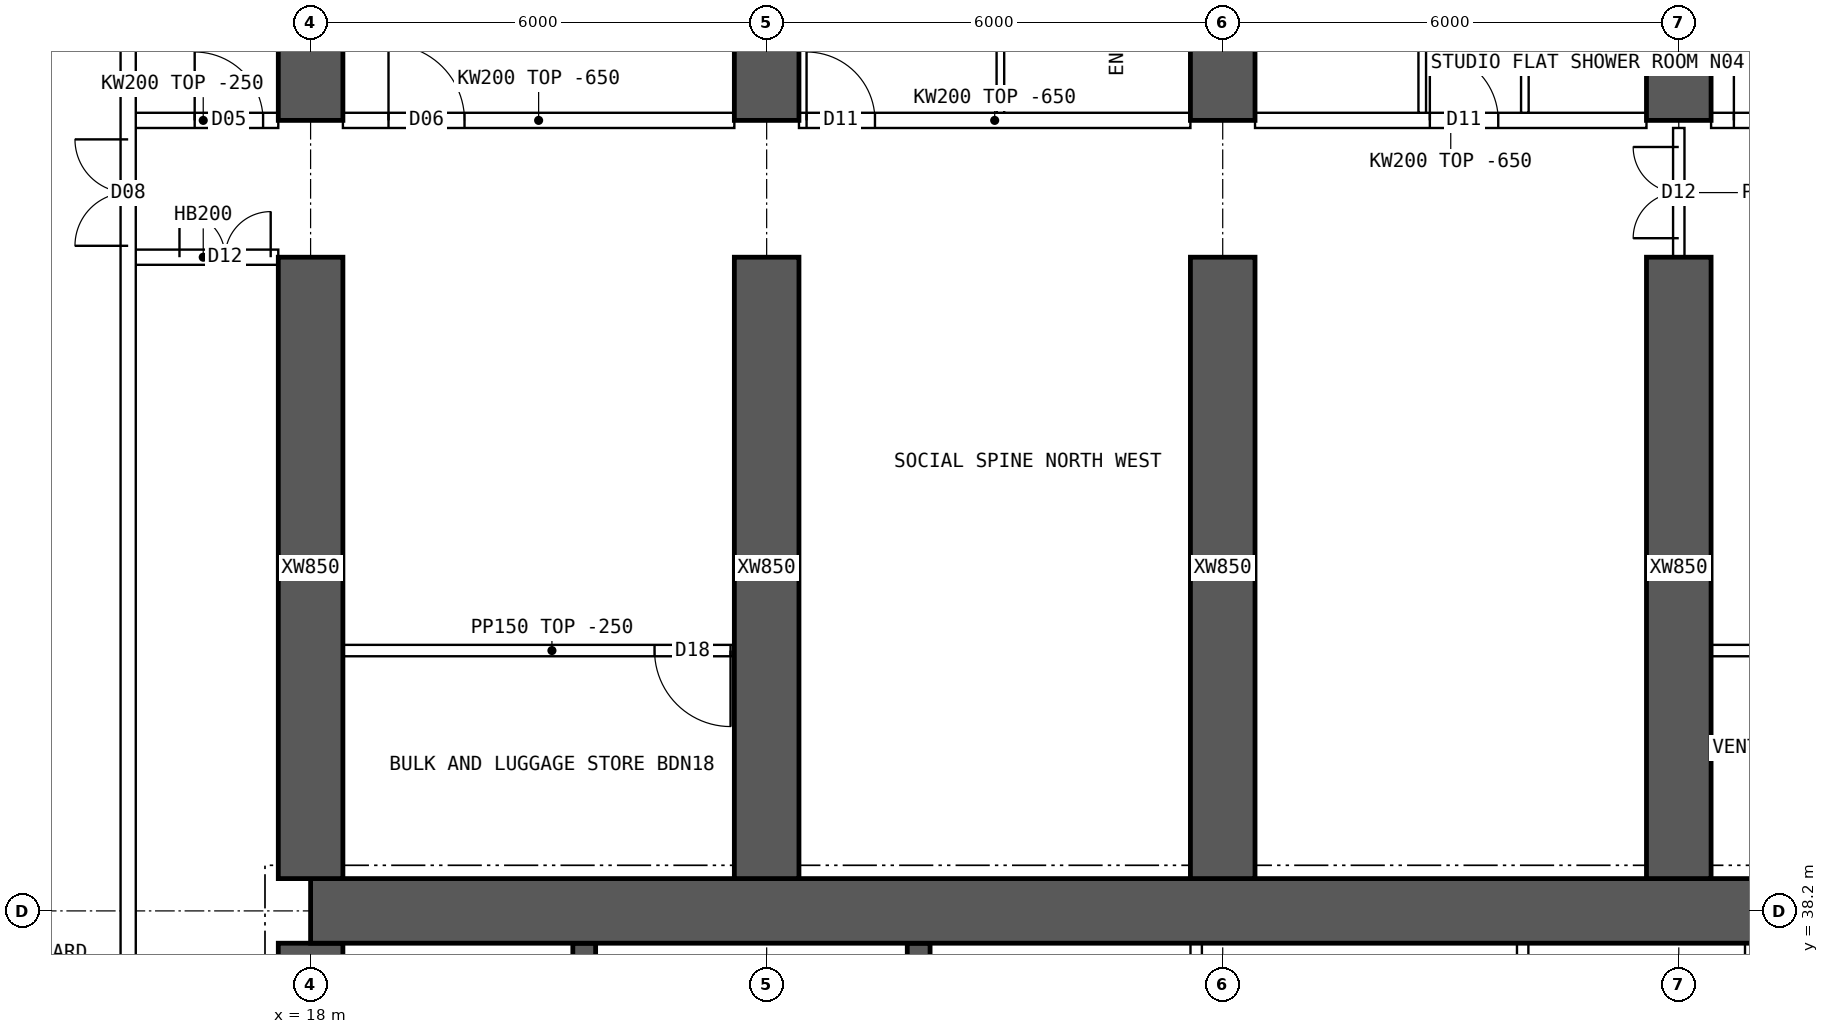
"""IFC4 building model, lengths in metres.
Left out: names, types, materials, properties, quantities, classifications, styles, units other than length and angle.
Written with IfcOpenShell. Run it as: python <this file> out.ifc"""

import sys

from ifc_helpers import new_model, si_unit, direction, frame, frame_2d, origin, place, context, subcontext, project, spatial, polyline, rectangle, outline, extrude, element, fill, save


model = new_model("IFC4")
c1 = context("Model", 3, precision=1e-05, world=origin(), true_north=direction((0.0, 1.0)))
c2 = subcontext(c1, "Body", "Model", "MODEL_VIEW")
j1 = project(units=[si_unit("LENGTHUNIT", "METRE"), si_unit("PLANEANGLEUNIT", "RADIAN")], contexts=[c1])
p1 = place(None, origin())
s1 = spatial("IfcSite", under=j1, at=p1, CompositionType="ELEMENT")
p2 = place(p1, origin())
s2 = spatial("IfcBuilding", under=s1, at=p2, CompositionType="ELEMENT")
p3 = place(p2, frame((0.0, 0.0, 167.35)))
s3 = spatial("IfcBuildingStorey", under=s2, at=p3, CompositionType="ELEMENT", Elevation=167.35)
p4 = place(p3, frame((18.0, 38.2, 0.0), z_axis=(0.0, 0.0, 1.0), x_axis=(1.0, 0.0, 0.0)))
e1 = element("IfcWall", 1, at=p4, inside=s3, PredefinedType="SHEAR", context=c2, shape_type="SweptSolid", body=[
    extrude(rectangle(XDim=48.0, YDim=0.85, at=frame_2d((24.0, 0.0))), origin(), (0.0, 0.0, 1.0), 3.75),
])
p5 = place(p3, frame((18.0, 26.225, 0.0), z_axis=(0.0, 0.0, 1.0), x_axis=(0.0, 1.0, 0.0)))
e2 = element("IfcWall", 2, at=p5, inside=s3, PredefinedType="SHEAR", context=c2, shape_type="SweptSolid", body=[
    extrude(rectangle(XDim=11.55, YDim=0.85, at=frame_2d((5.775, 0.0))), origin(), (0.0, 0.0, 1.0), 3.75),
])
p6 = place(p5, frame((5.075, 0.0, 0.0)))
e3 = element("IfcOpeningElement", 3, at=p6, cuts=e2, PredefinedType="OPENING", context=c2, shape_type="SweptSolid", body=[
    extrude(rectangle(XDim=1.2, YDim=2.1, at=frame_2d((0.6, 1.05))), frame((0.0, 0.435, 0.0), z_axis=(0.0, -1.0, 0.0), x_axis=(1.0, 0.0, 0.0)), (0.0, 0.0, 1.0), 0.87),
])
for number, where, z_axis, x_axis in (
    (4, (21.6, 34.75, 0.0), (0.0, 0.0, 1.0), (0.0, 1.0, 0.0)),
    (5, (26.0, 34.75, 0.0), (0.0, 0.0, 1.0), (0.0, 1.0, 0.0)),
):
    element("IfcWall", number, at=place(p3, frame(where, z_axis=z_axis, x_axis=x_axis)), inside=s3, PredefinedType="SHEAR", context=c2, shape_type="SweptSolid", body=[
        extrude(rectangle(XDim=3.025, YDim=0.3, at=frame_2d((1.512, 0.0))), origin(), (0.0, 0.0, 1.0), 3.75),
    ])
p7 = place(p3, frame((18.0, 48.6, 0.0), z_axis=(0.0, 0.0, 1.0), x_axis=(0.0, 1.0, 0.0)))
e6 = element("IfcWall", 6, at=p7, inside=s3, PredefinedType="SHEAR", context=c2, shape_type="SweptSolid", body=[
    extrude(rectangle(XDim=5.4, YDim=0.85, at=frame_2d((2.7, 0.0))), origin(), (0.0, 0.0, 1.0), 3.75),
])
p8 = place(p3, frame((18.0, 38.625, 0.0), z_axis=(0.0, 0.0, 1.0), x_axis=(0.0, 1.0, 0.0)))
e7 = element("IfcWall", 7, at=p8, inside=s3, PredefinedType="SHEAR", context=c2, shape_type="SweptSolid", body=[
    extrude(rectangle(XDim=8.175, YDim=0.85, at=frame_2d((4.087, 0.0))), origin(), (0.0, 0.0, 1.0), 3.75),
])
p9 = place(p3, frame((24.0, 48.6, 0.0), z_axis=(0.0, 0.0, 1.0), x_axis=(0.0, 1.0, 0.0)))
e8 = element("IfcWall", 8, at=p9, inside=s3, PredefinedType="SHEAR", context=c2, shape_type="SweptSolid", body=[
    extrude(rectangle(XDim=5.4, YDim=0.85, at=frame_2d((2.7, 0.0))), origin(), (0.0, 0.0, 1.0), 3.75),
])
p10 = place(p3, frame((24.0, 38.625, 0.0), z_axis=(0.0, 0.0, 1.0), x_axis=(0.0, 1.0, 0.0)))
e9 = element("IfcWall", 9, at=p10, inside=s3, PredefinedType="SHEAR", context=c2, shape_type="SweptSolid", body=[
    extrude(rectangle(XDim=8.175, YDim=0.85, at=frame_2d((4.087, 0.0))), origin(), (0.0, 0.0, 1.0), 3.75),
])
p11 = place(p3, frame((30.0, 48.6, 0.0), z_axis=(0.0, 0.0, 1.0), x_axis=(0.0, 1.0, 0.0)))
e10 = element("IfcWall", 10, at=p11, inside=s3, PredefinedType="SHEAR", context=c2, shape_type="SweptSolid", body=[
    extrude(rectangle(XDim=5.4, YDim=0.85, at=frame_2d((2.7, 0.0))), origin(), (0.0, 0.0, 1.0), 3.75),
])
p12 = place(p3, frame((30.0, 38.625, 0.0), z_axis=(0.0, 0.0, 1.0), x_axis=(0.0, 1.0, 0.0)))
e11 = element("IfcWall", 11, at=p12, inside=s3, PredefinedType="SHEAR", context=c2, shape_type="SweptSolid", body=[
    extrude(rectangle(XDim=8.175, YDim=0.85, at=frame_2d((4.087, 0.0))), origin(), (0.0, 0.0, 1.0), 3.75),
])
p13 = place(p3, frame((36.0, 48.6, 0.0), z_axis=(0.0, 0.0, 1.0), x_axis=(0.0, 1.0, 0.0)))
e12 = element("IfcWall", 12, at=p13, inside=s3, PredefinedType="SHEAR", context=c2, shape_type="SweptSolid", body=[
    extrude(rectangle(XDim=5.4, YDim=0.85, at=frame_2d((2.7, 0.0))), origin(), (0.0, 0.0, 1.0), 3.75),
])
p14 = place(p3, frame((36.0, 38.625, 0.0), z_axis=(0.0, 0.0, 1.0), x_axis=(0.0, 1.0, 0.0)))
e13 = element("IfcWall", 13, at=p14, inside=s3, PredefinedType="SHEAR", context=c2, shape_type="SweptSolid", body=[
    extrude(rectangle(XDim=8.175, YDim=0.85, at=frame_2d((4.087, 0.0))), origin(), (0.0, 0.0, 1.0), 3.75),
])
for number, where, z_axis, x_axis in (
    (14, (29.651, 34.75, 0.0), (0.0, 0.0, 1.0), (0.0, 1.0, 0.0)),
    (15, (33.946, 34.75, 0.0), (0.0, 0.0, 1.0), (0.0, 1.0, 0.0)),
    (16, (36.946, 34.75, 0.0), (0.0, 0.0, 1.0), (0.0, 1.0, 0.0)),
):
    element("IfcWall", number, at=place(p3, frame(where, z_axis=z_axis, x_axis=x_axis)), inside=s3, PredefinedType="SOLIDWALL", context=c2, shape_type="SweptSolid", body=[
        extrude(rectangle(XDim=3.025, YDim=0.15, at=frame_2d((1.512, 0.0))), origin(), (0.0, 0.0, 1.0), 3.5),
    ])
p15 = place(p3, frame((15.6, 48.6, 0.0), z_axis=(0.0, 0.0, 1.0), x_axis=(1.0, 0.0, 0.0)))
e17 = element("IfcWall", 17, at=p15, inside=s3, PredefinedType="SOLIDWALL", context=c2, shape_type="SweptSolid", body=[
    extrude(rectangle(XDim=1.975, YDim=0.2, at=frame_2d((0.987, 0.0))), origin(), (0.0, 0.0, 1.0), 3.5),
])
p16 = place(p15, frame((0.875, 0.0, 0.0)))
e18 = element("IfcOpeningElement", 18, at=p16, cuts=e17, PredefinedType="OPENING", context=c2, shape_type="SweptSolid", body=[
    extrude(rectangle(XDim=0.9, YDim=2.1, at=frame_2d((0.45, 1.05))), frame((0.0, 0.11, 0.0), z_axis=(0.0, -1.0, 0.0), x_axis=(1.0, 0.0, 0.0)), (0.0, 0.0, 1.0), 0.22),
])
p17 = place(p3, frame((15.6, 46.8, 0.0), z_axis=(0.0, 0.0, 1.0), x_axis=(1.0, 0.0, 0.0)))
e19 = element("IfcWall", 19, at=p17, inside=s3, PredefinedType="SOLIDWALL", context=c2, shape_type="SweptSolid", body=[
    extrude(rectangle(XDim=1.975, YDim=0.2, at=frame_2d((0.987, 0.0))), origin(), (0.0, 0.0, 1.0), 3.5),
])
p18 = place(p17, frame((0.675, 0.0, 0.0)))
e20 = element("IfcOpeningElement", 20, at=p18, cuts=e19, PredefinedType="OPENING", context=c2, shape_type="SweptSolid", body=[
    extrude(rectangle(XDim=1.2, YDim=2.1, at=frame_2d((0.6, 1.05))), frame((0.0, 0.11, 0.0), z_axis=(0.0, -1.0, 0.0), x_axis=(1.0, 0.0, 0.0)), (0.0, 0.0, 1.0), 0.22),
])
p19 = place(p3, frame((18.425, 48.6, 0.0), z_axis=(0.0, 0.0, 1.0), x_axis=(1.0, 0.0, 0.0)))
e21 = element("IfcWall", 21, at=p19, inside=s3, PredefinedType="SOLIDWALL", context=c2, shape_type="SweptSolid", body=[
    extrude(outline(polyline([(0.0, 0.0), (5.15, 0.0), (5.15, 3.1), (0.0, 3.1), (0.0, 0.0)])), frame((0.0, 0.1, 0.0), z_axis=(0.0, -1.0, 0.0), x_axis=(1.0, 0.0, 0.0)), (0.0, 0.0, 1.0), 0.2),
])
p20 = place(p19, frame((0.6, 0.0, 0.0)))
e22 = element("IfcOpeningElement", 22, at=p20, cuts=e21, PredefinedType="OPENING", context=c2, shape_type="SweptSolid", body=[
    extrude(rectangle(XDim=1.0, YDim=2.1, at=frame_2d((0.5, 1.05))), frame((0.0, 0.11, 0.0), z_axis=(0.0, -1.0, 0.0), x_axis=(1.0, 0.0, 0.0)), (0.0, 0.0, 1.0), 0.22),
])
p21 = place(p3, frame((24.425, 48.6, 0.0), z_axis=(0.0, 0.0, 1.0), x_axis=(1.0, 0.0, 0.0)))
e23 = element("IfcWall", 23, at=p21, inside=s3, PredefinedType="SOLIDWALL", context=c2, shape_type="SweptSolid", body=[
    extrude(outline(polyline([(0.0, 0.0), (5.15, 0.0), (5.15, 3.1), (0.0, 3.1), (0.0, 0.0)])), frame((0.0, 0.1, 0.0), z_axis=(0.0, -1.0, 0.0), x_axis=(1.0, 0.0, 0.0)), (0.0, 0.0, 1.0), 0.2),
])
p22 = place(p21, frame((0.1, 0.0, 0.0)))
e24 = element("IfcOpeningElement", 24, at=p22, cuts=e23, PredefinedType="OPENING", context=c2, shape_type="SweptSolid", body=[
    extrude(rectangle(XDim=0.9, YDim=2.1, at=frame_2d((0.45, 1.05))), frame((0.0, 0.11, 0.0), z_axis=(0.0, -1.0, 0.0), x_axis=(1.0, 0.0, 0.0)), (0.0, 0.0, 1.0), 0.22),
])
p23 = place(p3, frame((30.425, 48.6, 0.0), z_axis=(0.0, 0.0, 1.0), x_axis=(1.0, 0.0, 0.0)))
e25 = element("IfcWall", 25, at=p23, inside=s3, PredefinedType="SOLIDWALL", context=c2, shape_type="SweptSolid", body=[
    extrude(outline(polyline([(0.0, 0.0), (5.15, 0.0), (5.15, 3.1), (0.0, 3.1), (0.0, 0.0)])), frame((0.0, 0.1, 0.0), z_axis=(0.0, -1.0, 0.0), x_axis=(1.0, 0.0, 0.0)), (0.0, 0.0, 1.0), 0.2),
])
p24 = place(p23, frame((2.3, 0.0, 0.0)))
e26 = element("IfcOpeningElement", 26, at=p24, cuts=e25, PredefinedType="OPENING", context=c2, shape_type="SweptSolid", body=[
    extrude(rectangle(XDim=0.9, YDim=2.1, at=frame_2d((0.45, 1.05))), frame((0.0, 0.11, 0.0), z_axis=(0.0, -1.0, 0.0), x_axis=(1.0, 0.0, 0.0)), (0.0, 0.0, 1.0), 0.22),
])
p25 = place(p3, frame((36.425, 48.6, 0.0), z_axis=(0.0, 0.0, 1.0), x_axis=(1.0, 0.0, 0.0)))
e27 = element("IfcWall", 27, at=p25, inside=s3, PredefinedType="SOLIDWALL", context=c2, shape_type="SweptSolid", body=[
    extrude(outline(polyline([(0.0, 0.0), (5.15, 0.0), (5.15, 3.1), (0.0, 3.1), (0.0, 0.0)])), frame((0.0, 0.1, 0.0), z_axis=(0.0, -1.0, 0.0), x_axis=(1.0, 0.0, 0.0)), (0.0, 0.0, 1.0), 0.2),
])
p26 = place(p25, frame((0.3, 0.0, 0.0)))
e28 = element("IfcOpeningElement", 28, at=p26, cuts=e27, PredefinedType="OPENING", context=c2, shape_type="SweptSolid", body=[
    extrude(rectangle(XDim=1.0, YDim=2.1, at=frame_2d((0.5, 1.05))), frame((0.0, 0.11, 0.0), z_axis=(0.0, -1.0, 0.0), x_axis=(1.0, 0.0, 0.0)), (0.0, 0.0, 1.0), 0.22),
])
p27 = place(p3, frame((27.075, 51.45, 0.0), z_axis=(0.0, 0.0, 1.0), x_axis=(0.0, -1.0, 0.0)))
e29 = element("IfcWall", 29, at=p27, inside=s3, PredefinedType="PARTITIONING", context=c2, shape_type="SweptSolid", body=[
    extrude(outline(polyline([(0.0, 0.0), (2.75, 0.0), (2.75, 3.1), (2.702, 3.1), (2.7, 3.5), (0.0, 3.5), (0.0, 0.0)])), frame((0.0, 0.05, 0.0), z_axis=(0.0, -1.0, 0.0), x_axis=(1.0, 0.0, 0.0)), (0.0, 0.0, 1.0), 0.1),
])
p28 = place(p3, frame((32.625, 51.05, 0.0), z_axis=(0.0, 0.0, 1.0), x_axis=(0.0, -1.0, 0.0)))
e30 = element("IfcWall", 30, at=p28, inside=s3, PredefinedType="PARTITIONING", context=c2, shape_type="SweptSolid", body=[
    extrude(outline(polyline([(0.0, 0.0), (2.35, 0.0), (2.35, 3.1), (2.302, 3.1), (2.3, 3.5), (0.0, 3.5), (0.0, 0.0)])), frame((0.0, 0.05, 0.0), z_axis=(0.0, -1.0, 0.0), x_axis=(1.0, 0.0, 0.0)), (0.0, 0.0, 1.0), 0.1),
])
p29 = place(p3, frame((33.975, 51.05, 0.0), z_axis=(0.0, 0.0, 1.0), x_axis=(0.0, -1.0, 0.0)))
e31 = element("IfcWall", 31, at=p29, inside=s3, PredefinedType="PARTITIONING", context=c2, shape_type="SweptSolid", body=[
    extrude(outline(polyline([(0.0, 0.0), (2.35, 0.0), (2.35, 3.1), (2.302, 3.1), (2.3, 3.5), (0.0, 3.5), (0.0, 0.0)])), frame((0.0, 0.05, 0.0), z_axis=(0.0, -1.0, 0.0), x_axis=(1.0, 0.0, 0.0)), (0.0, 0.0, 1.0), 0.1),
])
p30 = place(p29, frame((0.8, 0.0, 0.0)))
e32 = element("IfcOpeningElement", 32, at=p30, cuts=e31, PredefinedType="OPENING", context=c2, shape_type="SweptSolid", body=[
    extrude(rectangle(XDim=0.8, YDim=2.1, at=frame_2d((0.4, 1.05))), frame((0.0, 0.06, 0.0), z_axis=(0.0, -1.0, 0.0), x_axis=(1.0, 0.0, 0.0)), (0.0, 0.0, 1.0), 0.12),
])
p31 = place(p3, frame((23.925, 41.625, 0.0), z_axis=(0.0, 0.0, 1.0), x_axis=(-1.0, 0.0, 0.0)))
e33 = element("IfcWall", 33, at=p31, inside=s3, PredefinedType="PARTITIONING", context=c2, shape_type="SweptSolid", body=[
    extrude(rectangle(XDim=5.5, YDim=0.15, at=frame_2d((2.75, 0.0))), origin(), (0.0, 0.0, 1.0), 3.5),
])
p32 = place(p31, frame((0.4, 0.0, 0.0)))
e34 = element("IfcOpeningElement", 34, at=p32, cuts=e33, PredefinedType="OPENING", context=c2, shape_type="SweptSolid", body=[
    extrude(rectangle(XDim=1.0, YDim=2.1, at=frame_2d((0.5, 1.05))), frame((0.0, 0.085, 0.0), z_axis=(0.0, -1.0, 0.0), x_axis=(1.0, 0.0, 0.0)), (0.0, 0.0, 1.0), 0.17),
])
p33 = place(p3, frame((41.575, 41.625, 0.0), z_axis=(0.0, 0.0, 1.0), x_axis=(-1.0, 0.0, 0.0)))
e35 = element("IfcWall", 35, at=p33, inside=s3, PredefinedType="PARTITIONING", context=c2, shape_type="SweptSolid", body=[
    extrude(rectangle(XDim=5.5, YDim=0.15, at=frame_2d((2.75, 0.0))), origin(), (0.0, 0.0, 1.0), 3.5),
])
p34 = place(p33, frame((0.4, 0.0, 0.0)))
e36 = element("IfcOpeningElement", 36, at=p34, cuts=e35, PredefinedType="OPENING", context=c2, shape_type="SweptSolid", body=[
    extrude(rectangle(XDim=1.0, YDim=2.1, at=frame_2d((0.5, 1.05))), frame((0.0, 0.085, 0.0), z_axis=(0.0, -1.0, 0.0), x_axis=(1.0, 0.0, 0.0)), (0.0, 0.0, 1.0), 0.17),
])
p35 = place(p3, frame((36.0, 46.8, 0.0), z_axis=(0.0, 0.0, 1.0), x_axis=(0.0, 1.0, 0.0)))
e37 = element("IfcWall", 37, at=p35, inside=s3, PredefinedType="PARTITIONING", context=c2, shape_type="SweptSolid", body=[
    extrude(outline(polyline([(0.0, 0.0), (1.7, 0.0), (1.7, 3.1), (0.0, 3.1), (0.0, 0.0)])), frame((0.0, 0.075, 0.0), z_axis=(0.0, -1.0, 0.0), x_axis=(1.0, 0.0, 0.0)), (0.0, 0.0, 1.0), 0.15),
])
p36 = place(p35, frame((0.25, 0.0, 0.0)))
e38 = element("IfcOpeningElement", 38, at=p36, cuts=e37, PredefinedType="OPENING", context=c2, shape_type="SweptSolid", body=[
    extrude(rectangle(XDim=1.2, YDim=2.1, at=frame_2d((0.6, 1.05))), frame((0.0, 0.085, 0.0), z_axis=(0.0, -1.0, 0.0), x_axis=(1.0, 0.0, 0.0)), (0.0, 0.0, 1.0), 0.17),
])
p37 = place(p3, frame((15.6, 10.446, 0.0), z_axis=(0.0, 0.0, 1.0), x_axis=(0.0, 1.0, 0.0)))
e39 = element("IfcWall", 39, at=p37, inside=s3, PredefinedType="SOLIDWALL", context=c2, shape_type="SweptSolid", body=[
    extrude(rectangle(XDim=43.107, YDim=0.2, at=frame_2d((21.554, 0.0))), origin(), (0.0, 0.0, 1.0), 3.5),
])
p38 = place(p37, frame((13.914, 0.0, 0.0)))
e40 = element("IfcOpeningElement", 40, at=p38, cuts=e39, PredefinedType="OPENING", context=c2, shape_type="SweptSolid", body=[
    extrude(rectangle(XDim=1.2, YDim=2.1, at=frame_2d((0.6, 1.05))), frame((0.0, 0.11, 0.0), z_axis=(0.0, -1.0, 0.0), x_axis=(1.0, 0.0, 0.0)), (0.0, 0.0, 1.0), 0.22),
])
p39 = place(p37, frame((5.104, 0.0, 0.0)))
e41 = element("IfcOpeningElement", 41, at=p39, cuts=e39, PredefinedType="OPENING", context=c2, shape_type="SweptSolid", body=[
    extrude(rectangle(XDim=1.4, YDim=2.1, at=frame_2d((0.7, 1.05))), frame((0.0, 0.11, 0.0), z_axis=(0.0, -1.0, 0.0), x_axis=(1.0, 0.0, 0.0)), (0.0, 0.0, 1.0), 0.22),
])
p40 = place(p37, frame((36.504, 0.0, 0.0)))
e42 = element("IfcOpeningElement", 42, at=p40, cuts=e39, PredefinedType="OPENING", context=c2, shape_type="SweptSolid", body=[
    extrude(rectangle(XDim=1.4, YDim=2.1, at=frame_2d((0.7, 1.05))), frame((0.0, 0.11, 0.0), z_axis=(0.0, -1.0, 0.0), x_axis=(1.0, 0.0, 0.0)), (0.0, 0.0, 1.0), 0.22),
])
p41 = place(p18, origin())
e43 = element("IfcDoor", 43, at=p41, inside=s3, OperationType="DOUBLE_DOOR_SINGLE_SWING", PredefinedType="DOOR", context=c2, shape_type="SweptSolid", body=[
    extrude(rectangle(XDim=1.2, YDim=2.1, at=frame_2d((0.6, 1.05))), frame((0.0, 0.025, 0.0), z_axis=(0.0, -1.0, 0.0), x_axis=(1.0, 0.0, 0.0)), (0.0, 0.0, 1.0), 0.05),
])
fill(e20, e43)
p42 = place(p20, origin())
e44 = element("IfcDoor", 44, at=p42, inside=s3, OperationType="SINGLE_SWING_LEFT", PredefinedType="DOOR", context=c2, shape_type="SweptSolid", body=[
    extrude(rectangle(XDim=1.0, YDim=2.1, at=frame_2d((0.5, 1.05))), frame((0.0, 0.025, 0.0), z_axis=(0.0, -1.0, 0.0), x_axis=(1.0, 0.0, 0.0)), (0.0, 0.0, 1.0), 0.05),
])
fill(e22, e44)
p43 = place(p22, origin())
e45 = element("IfcDoor", 45, at=p43, inside=s3, OperationType="SINGLE_SWING_LEFT", PredefinedType="DOOR", context=c2, shape_type="SweptSolid", body=[
    extrude(rectangle(XDim=0.9, YDim=2.1, at=frame_2d((0.45, 1.05))), frame((0.0, 0.025, 0.0), z_axis=(0.0, -1.0, 0.0), x_axis=(1.0, 0.0, 0.0)), (0.0, 0.0, 1.0), 0.05),
])
fill(e24, e45)
p44 = place(p30, origin())
e46 = element("IfcDoor", 46, at=p44, inside=s3, OperationType="SINGLE_SWING_RIGHT", PredefinedType="DOOR", context=c2, shape_type="SweptSolid", body=[
    extrude(rectangle(XDim=0.8, YDim=2.1, at=frame_2d((0.4, 1.05))), frame((0.0, 0.025, 0.0), z_axis=(0.0, -1.0, 0.0), x_axis=(1.0, 0.0, 0.0)), (0.0, 0.0, 1.0), 0.05),
])
fill(e32, e46)
p45 = place(p24, origin())
e47 = element("IfcDoor", 47, at=p45, inside=s3, OperationType="SINGLE_SWING_LEFT", PredefinedType="DOOR", context=c2, shape_type="SweptSolid", body=[
    extrude(rectangle(XDim=0.9, YDim=2.1, at=frame_2d((0.45, 1.05))), frame((0.0, 0.025, 0.0), z_axis=(0.0, -1.0, 0.0), x_axis=(1.0, 0.0, 0.0)), (0.0, 0.0, 1.0), 0.05),
])
fill(e26, e47)
p46 = place(p26, origin())
e48 = element("IfcDoor", 48, at=p46, inside=s3, OperationType="SINGLE_SWING_LEFT", PredefinedType="DOOR", context=c2, shape_type="SweptSolid", body=[
    extrude(rectangle(XDim=1.0, YDim=2.1, at=frame_2d((0.5, 1.05))), frame((0.0, 0.025, 0.0), z_axis=(0.0, -1.0, 0.0), x_axis=(1.0, 0.0, 0.0)), (0.0, 0.0, 1.0), 0.05),
])
fill(e28, e48)
p47 = place(p32, origin())
e49 = element("IfcDoor", 49, at=p47, inside=s3, OperationType="SINGLE_SWING_LEFT", PredefinedType="DOOR", context=c2, shape_type="SweptSolid", body=[
    extrude(rectangle(XDim=1.0, YDim=2.1, at=frame_2d((0.5, 1.05))), frame((0.0, 0.025, 0.0), z_axis=(0.0, -1.0, 0.0), x_axis=(1.0, 0.0, 0.0)), (0.0, 0.0, 1.0), 0.05),
])
fill(e34, e49)
p48 = place(p36, origin())
e50 = element("IfcDoor", 50, at=p48, inside=s3, OperationType="DOUBLE_DOOR_SINGLE_SWING", PredefinedType="DOOR", context=c2, shape_type="SweptSolid", body=[
    extrude(rectangle(XDim=1.2, YDim=2.1, at=frame_2d((0.6, 1.05))), frame((0.0, 0.025, 0.0), z_axis=(0.0, -1.0, 0.0), x_axis=(1.0, 0.0, 0.0)), (0.0, 0.0, 1.0), 0.05),
])
fill(e38, e50)
p49 = place(p40, origin())
e51 = element("IfcDoor", 51, at=p49, inside=s3, OperationType="DOUBLE_DOOR_SINGLE_SWING", PredefinedType="DOOR", context=c2, shape_type="SweptSolid", body=[
    extrude(rectangle(XDim=1.4, YDim=2.1, at=frame_2d((0.7, 1.05))), frame((0.0, 0.025, 0.0), z_axis=(0.0, -1.0, 0.0), x_axis=(1.0, 0.0, 0.0)), (0.0, 0.0, 1.0), 0.05),
])
fill(e42, e51)
p50 = place(p16, origin())
e52 = element("IfcDoor", 52, at=p50, inside=s3, OperationType="SINGLE_SWING_LEFT", PredefinedType="DOOR", context=c2, shape_type="SweptSolid", body=[
    extrude(rectangle(XDim=0.9, YDim=2.1, at=frame_2d((0.45, 1.05))), frame((0.0, 0.025, 0.0), z_axis=(0.0, -1.0, 0.0), x_axis=(1.0, 0.0, 0.0)), (0.0, 0.0, 1.0), 0.05),
])
fill(e18, e52)
save(model, sys.argv[1])
